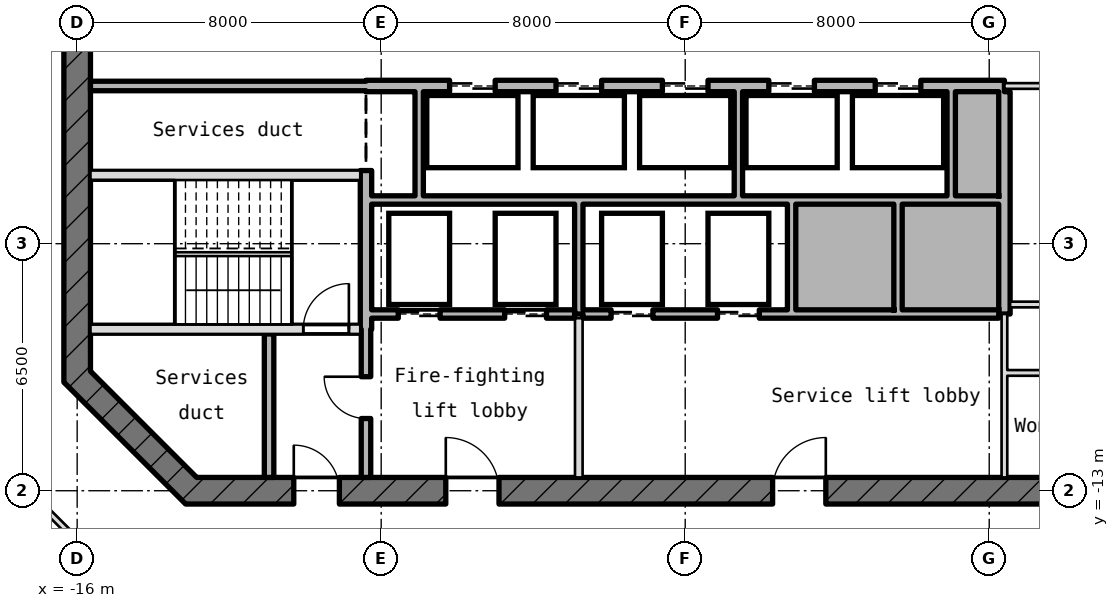
"""IFC4 building model, lengths in metres.
Left out: names, types, materials, properties, quantities, classifications, styles, units other than length and angle.
Written with IfcOpenShell. Run it as: python <this file> out.ifc"""

import sys

from ifc_helpers import new_model, si_unit, direction, frame, frame_2d, origin, place, context, subcontext, project, spatial, rectangle, extrude, element, fill, save


model = new_model("IFC4")
c1 = context("Model", 3, precision=1e-05, world=origin(), true_north=direction((0.0, 1.0)))
c2 = subcontext(c1, "Body", "Model", "MODEL_VIEW")
j1 = project(units=[si_unit("LENGTHUNIT", "METRE"), si_unit("PLANEANGLEUNIT", "RADIAN")], contexts=[c1])
p1 = place(None, origin())
s1 = spatial("IfcSite", under=j1, at=p1, CompositionType="ELEMENT")
p2 = place(p1, origin())
s2 = spatial("IfcBuilding", under=s1, at=p2, CompositionType="ELEMENT")
p3 = place(p2, frame((0.0, 0.0, 296.95)))
s3 = spatial("IfcBuildingStorey", under=s2, at=p3, CompositionType="ELEMENT", Elevation=296.95)
p4 = place(p3, frame((-16.0, 10.145, -0.18), z_axis=(0.0, 0.0, 1.0), x_axis=(0.0, -1.0, 0.0)))
e1 = element("IfcWall", 1, at=p4, inside=s3, PredefinedType="SHEAR", context=c2, shape_type="SweptSolid", body=[
    extrude(rectangle(XDim=20.29, YDim=0.7, at=frame_2d((10.145, 0.0))), origin(), (0.0, 0.0, 1.0), 4.15),
])
p5 = place(p4, frame((8.945, 0.0, 0.18)))
e2 = element("IfcOpeningElement", 2, at=p5, cuts=e1, PredefinedType="OPENING", context=c2, shape_type="SweptSolid", body=[
    extrude(rectangle(XDim=2.4, YDim=2.1, at=frame_2d((1.2, 1.05))), frame((0.0, 0.36, 0.0), z_axis=(0.0, -1.0, 0.0), x_axis=(1.0, 0.0, 0.0)), (0.0, 0.0, 1.0), 0.72),
])
p6 = place(p4, frame((5.545, 0.0, 0.18)))
e3 = element("IfcOpeningElement", 3, at=p6, cuts=e1, PredefinedType="OPENING", context=c2, shape_type="SweptSolid", body=[
    extrude(rectangle(XDim=1.2, YDim=2.1, at=frame_2d((0.6, 1.05))), frame((0.0, 0.36, 0.0), z_axis=(0.0, -1.0, 0.0), x_axis=(1.0, 0.0, 0.0)), (0.0, 0.0, 1.0), 0.72),
])
p7 = place(p3, frame((-16.103, -9.897, -0.18), z_axis=(0.0, 0.0, 1.0), x_axis=(0.707106781187, -0.707106781187, 0.0)))
e4 = element("IfcWall", 4, at=p7, inside=s3, PredefinedType="SHEAR", context=c2, shape_type="SweptSolid", body=[
    extrude(rectangle(XDim=4.533, YDim=0.7, at=frame_2d((2.266, 0.0))), origin(), (0.0, 0.0, 1.0), 4.15),
])
p8 = place(p3, frame((-13.145, -13.0, -0.18), z_axis=(0.0, 0.0, 1.0), x_axis=(1.0, 0.0, 0.0)))
e5 = element("IfcWall", 5, at=p8, inside=s3, PredefinedType="SHEAR", context=c2, shape_type="SweptSolid", body=[
    extrude(rectangle(XDim=26.29, YDim=0.7, at=frame_2d((13.145, 0.0))), origin(), (0.0, 0.0, 1.0), 4.15),
])
p9 = place(p8, frame((2.845, 0.0, 0.18)))
e6 = element("IfcOpeningElement", 6, at=p9, cuts=e5, PredefinedType="OPENING", context=c2, shape_type="SweptSolid", body=[
    extrude(rectangle(XDim=1.2, YDim=2.1, at=frame_2d((0.6, 1.05))), frame((0.0, 0.36, 0.0), z_axis=(0.0, -1.0, 0.0), x_axis=(1.0, 0.0, 0.0)), (0.0, 0.0, 1.0), 0.72),
])
p10 = place(p8, frame((6.845, 0.0, 0.18)))
e7 = element("IfcOpeningElement", 7, at=p10, cuts=e5, PredefinedType="OPENING", context=c2, shape_type="SweptSolid", body=[
    extrude(rectangle(XDim=1.4, YDim=2.1, at=frame_2d((0.7, 1.05))), frame((0.0, 0.36, 0.0), z_axis=(0.0, -1.0, 0.0), x_axis=(1.0, 0.0, 0.0)), (0.0, 0.0, 1.0), 0.72),
])
p11 = place(p8, frame((15.445, 0.0, 0.18)))
e8 = element("IfcOpeningElement", 8, at=p11, cuts=e5, PredefinedType="OPENING", context=c2, shape_type="SweptSolid", body=[
    extrude(rectangle(XDim=1.4, YDim=2.1, at=frame_2d((0.7, 1.05))), frame((0.0, 0.36, 0.0), z_axis=(0.0, -1.0, 0.0), x_axis=(1.0, 0.0, 0.0)), (0.0, 0.0, 1.0), 0.72),
])
p12 = place(p3, frame((8.475, -9.9, 0.0), z_axis=(0.0, 0.0, 1.0), x_axis=(1.0, 0.0, 0.0)))
e9 = element("IfcWall", 9, at=p12, inside=s3, PredefinedType="PARTITIONING", context=c2, shape_type="SweptSolid", body=[
    extrude(rectangle(XDim=7.13, YDim=0.15, at=frame_2d((3.565, 0.0))), origin(), (0.0, 0.0, 1.0), 3.97),
])
p13 = place(p12, frame((3.028, 0.0, 0.0)))
e10 = element("IfcOpeningElement", 10, at=p13, cuts=e9, PredefinedType="OPENING", context=c2, shape_type="SweptSolid", body=[
    extrude(rectangle(XDim=1.0, YDim=2.1, at=frame_2d((0.5, 1.05))), frame((0.0, 0.085, 0.0), z_axis=(0.0, -1.0, 0.0), x_axis=(1.0, 0.0, 0.0)), (0.0, 0.0, 1.0), 0.17),
])
p14 = place(p3, frame((-15.65, -8.75, -0.18), z_axis=(0.0, 0.0, 1.0), x_axis=(1.0, 0.0, 0.0)))
e11 = element("IfcWall", 11, at=p14, inside=s3, PredefinedType="SHEAR", context=c2, shape_type="SweptSolid", body=[
    extrude(rectangle(XDim=7.1, YDim=0.25, at=frame_2d((3.55, 0.0))), origin(), (0.0, 0.0, 1.0), 4.15),
])
p15 = place(p14, frame((5.6, 0.0, 0.18)))
e12 = element("IfcOpeningElement", 12, at=p15, cuts=e11, PredefinedType="OPENING", context=c2, shape_type="SweptSolid", body=[
    extrude(rectangle(XDim=1.2, YDim=2.1, at=frame_2d((0.6, 1.05))), frame((0.0, 0.135, 0.0), z_axis=(0.0, -1.0, 0.0), x_axis=(1.0, 0.0, 0.0)), (0.0, 0.0, 1.0), 0.27),
])
p16 = place(p3, frame((-8.25, -8.35, 0.0), z_axis=(0.0, 0.0, 1.0), x_axis=(1.0, 0.0, 0.0)))
e13 = element("IfcWall", 13, at=p16, inside=s3, PredefinedType="STANDARD", context=c2, shape_type="SweptSolid", body=[
    extrude(rectangle(XDim=5.34, YDim=0.22, at=frame_2d((2.67, 0.0))), origin(), (0.0, 0.0, 1.0), 3.97),
])
p17 = place(p16, frame((0.7, 0.0, 0.0)))
e14 = element("IfcOpeningElement", 14, at=p17, cuts=e13, PredefinedType="OPENING", context=c2, shape_type="SweptSolid", body=[
    extrude(rectangle(XDim=1.1, YDim=2.1, at=frame_2d((0.55, 1.05))), frame((0.0, 0.12, 0.0), z_axis=(0.0, -1.0, 0.0), x_axis=(1.0, 0.0, 0.0)), (0.0, 0.0, 1.0), 0.24),
])
p18 = place(p16, frame((3.5, 0.0, 0.0)))
e15 = element("IfcOpeningElement", 15, at=p18, cuts=e13, PredefinedType="OPENING", context=c2, shape_type="SweptSolid", body=[
    extrude(rectangle(XDim=1.1, YDim=2.1, at=frame_2d((0.55, 1.05))), frame((0.0, 0.12, 0.0), z_axis=(0.0, -1.0, 0.0), x_axis=(1.0, 0.0, 0.0)), (0.0, 0.0, 1.0), 0.24),
])
p19 = place(p3, frame((-2.69, -8.35, 0.0), z_axis=(0.0, 0.0, 1.0), x_axis=(1.0, 0.0, 0.0)))
e16 = element("IfcWall", 16, at=p19, inside=s3, PredefinedType="STANDARD", context=c2, shape_type="SweptSolid", body=[
    extrude(rectangle(XDim=10.94, YDim=0.22, at=frame_2d((5.47, 0.0))), origin(), (0.0, 0.0, 1.0), 3.97),
])
p20 = place(p19, frame((0.74, 0.0, 0.0)))
e17 = element("IfcOpeningElement", 17, at=p20, cuts=e16, PredefinedType="OPENING", context=c2, shape_type="SweptSolid", body=[
    extrude(rectangle(XDim=1.1, YDim=2.1, at=frame_2d((0.55, 1.05))), frame((0.0, 0.12, 0.0), z_axis=(0.0, -1.0, 0.0), x_axis=(1.0, 0.0, 0.0)), (0.0, 0.0, 1.0), 0.24),
])
p21 = place(p19, frame((3.54, 0.0, 0.0)))
e18 = element("IfcOpeningElement", 18, at=p21, cuts=e16, PredefinedType="OPENING", context=c2, shape_type="SweptSolid", body=[
    extrude(rectangle(XDim=1.1, YDim=2.1, at=frame_2d((0.55, 1.05))), frame((0.0, 0.12, 0.0), z_axis=(0.0, -1.0, 0.0), x_axis=(1.0, 0.0, 0.0)), (0.0, 0.0, 1.0), 0.24),
])
p22 = place(p3, frame((8.55, -8.1, 0.0), z_axis=(0.0, 0.0, 1.0), x_axis=(1.0, 0.0, 0.0)))
e19 = element("IfcWall", 19, at=p22, inside=s3, PredefinedType="PARTITIONING", context=c2, shape_type="SweptSolid", body=[
    extrude(rectangle(XDim=7.1, YDim=0.15, at=frame_2d((3.55, 0.0))), origin(), (0.0, 0.0, 1.0), 3.97),
])
p23 = place(p22, frame((2.975, 0.0, 0.0)))
e20 = element("IfcOpeningElement", 20, at=p23, cuts=e19, PredefinedType="OPENING", context=c2, shape_type="SweptSolid", body=[
    extrude(rectangle(XDim=1.0, YDim=2.1, at=frame_2d((0.5, 1.05))), frame((0.0, 0.085, 0.0), z_axis=(0.0, -1.0, 0.0), x_axis=(1.0, 0.0, 0.0)), (0.0, 0.0, 1.0), 0.17),
])
p24 = place(p3, frame((-8.25, -5.35, 0.0), z_axis=(0.0, 0.0, 1.0), x_axis=(1.0, 0.0, 0.0)))
e21 = element("IfcWall", 21, at=p24, inside=s3, PredefinedType="STANDARD", context=c2, shape_type="SweptSolid", body=[
    extrude(rectangle(XDim=16.5, YDim=0.22, at=frame_2d((8.25, 0.0))), origin(), (0.0, 0.0, 1.0), 3.97),
])
p25 = place(p3, frame((-15.65, -4.7, -0.18), z_axis=(0.0, 0.0, 1.0), x_axis=(1.0, 0.0, 0.0)))
e22 = element("IfcWall", 22, at=p25, inside=s3, PredefinedType="SHEAR", context=c2, shape_type="SweptSolid", body=[
    extrude(rectangle(XDim=7.1, YDim=0.25, at=frame_2d((3.55, 0.0))), origin(), (0.0, 0.0, 1.0), 4.15),
])
p26 = place(p3, frame((-15.65, -2.35, 0.0), z_axis=(0.0, 0.0, 1.0), x_axis=(1.0, 0.0, 0.0)))
e23 = element("IfcWall", 23, at=p26, inside=s3, PredefinedType="STANDARD", context=c2, shape_type="SweptSolid", body=[
    extrude(rectangle(XDim=7.25, YDim=0.25, at=frame_2d((3.625, 0.0))), origin(), (0.0, 0.0, 1.0), 3.97),
])
p27 = place(p3, frame((-8.4, -2.35, -0.18), z_axis=(0.0, 0.0, 1.0), x_axis=(1.0, 0.0, 0.0)))
e24 = element("IfcWall", 24, at=p27, inside=s3, PredefinedType="SHEAR", context=c2, shape_type="SweptSolid", body=[
    extrude(rectangle(XDim=16.8, YDim=0.3, at=frame_2d((8.4, 0.0))), origin(), (0.0, 0.0, 1.0), 4.15),
])
p28 = place(p27, frame((2.2, 0.0, 0.18)))
e25 = element("IfcOpeningElement", 25, at=p28, cuts=e24, PredefinedType="OPENING", context=c2, shape_type="SweptSolid", body=[
    extrude(rectangle(XDim=1.2, YDim=2.1, at=frame_2d((0.6, 1.05))), frame((0.0, 0.16, 0.0), z_axis=(0.0, -1.0, 0.0), x_axis=(1.0, 0.0, 0.0)), (0.0, 0.0, 1.0), 0.32),
])
p29 = place(p27, frame((5.0, 0.0, 0.18)))
e26 = element("IfcOpeningElement", 26, at=p29, cuts=e24, PredefinedType="OPENING", context=c2, shape_type="SweptSolid", body=[
    extrude(rectangle(XDim=1.2, YDim=2.1, at=frame_2d((0.6, 1.05))), frame((0.0, 0.16, 0.0), z_axis=(0.0, -1.0, 0.0), x_axis=(1.0, 0.0, 0.0)), (0.0, 0.0, 1.0), 0.32),
])
p30 = place(p27, frame((7.8, 0.0, 0.18)))
e27 = element("IfcOpeningElement", 27, at=p30, cuts=e24, PredefinedType="OPENING", context=c2, shape_type="SweptSolid", body=[
    extrude(rectangle(XDim=1.2, YDim=2.1, at=frame_2d((0.6, 1.05))), frame((0.0, 0.16, 0.0), z_axis=(0.0, -1.0, 0.0), x_axis=(1.0, 0.0, 0.0)), (0.0, 0.0, 1.0), 0.32),
])
p31 = place(p27, frame((10.6, 0.0, 0.18)))
e28 = element("IfcOpeningElement", 28, at=p31, cuts=e24, PredefinedType="OPENING", context=c2, shape_type="SweptSolid", body=[
    extrude(rectangle(XDim=1.2, YDim=2.1, at=frame_2d((0.6, 1.05))), frame((0.0, 0.16, 0.0), z_axis=(0.0, -1.0, 0.0), x_axis=(1.0, 0.0, 0.0)), (0.0, 0.0, 1.0), 0.32),
])
p32 = place(p27, frame((13.4, 0.0, 0.18)))
e29 = element("IfcOpeningElement", 29, at=p32, cuts=e24, PredefinedType="OPENING", context=c2, shape_type="SweptSolid", body=[
    extrude(rectangle(XDim=1.2, YDim=2.1, at=frame_2d((0.6, 1.05))), frame((0.0, 0.16, 0.0), z_axis=(0.0, -1.0, 0.0), x_axis=(1.0, 0.0, 0.0)), (0.0, 0.0, 1.0), 0.32),
])
p33 = place(p3, frame((8.4, -2.35, 0.0), z_axis=(0.0, 0.0, 1.0), x_axis=(1.0, 0.0, 0.0)))
e30 = element("IfcWall", 30, at=p33, inside=s3, PredefinedType="PARTITIONING", context=c2, shape_type="SweptSolid", body=[
    extrude(rectangle(XDim=7.25, YDim=0.15, at=frame_2d((3.625, 0.0))), origin(), (0.0, 0.0, 1.0), 3.97),
])
p34 = place(p3, frame((-10.95, -12.65, 0.0), z_axis=(0.0, 0.0, 1.0), x_axis=(0.0, 1.0, 0.0)))
e31 = element("IfcWall", 31, at=p34, inside=s3, PredefinedType="STANDARD", context=c2, shape_type="SweptSolid", body=[
    extrude(rectangle(XDim=3.775, YDim=0.25, at=frame_2d((1.887, 0.0))), origin(), (0.0, 0.0, 1.0), 3.97),
])
p35 = place(p3, frame((-8.4, -12.65, 0.0), z_axis=(0.0, 0.0, 1.0), x_axis=(0.0, 1.0, 0.0)))
e32 = element("IfcWall", 32, at=p35, inside=s3, PredefinedType="STANDARD", context=c2, shape_type="SweptSolid", body=[
    extrude(rectangle(XDim=3.9, YDim=0.25, at=frame_2d((1.95, 0.0))), origin(), (0.0, 0.0, 1.0), 3.97),
])
p36 = place(p35, frame((1.55, 0.0, 0.0)))
e33 = element("IfcOpeningElement", 33, at=p36, cuts=e32, PredefinedType="OPENING", context=c2, shape_type="SweptSolid", body=[
    extrude(rectangle(XDim=1.1, YDim=2.1, at=frame_2d((0.55, 1.05))), frame((0.0, 0.135, 0.0), z_axis=(0.0, -1.0, 0.0), x_axis=(1.0, 0.0, 0.0)), (0.0, 0.0, 1.0), 0.27),
])
p37 = place(p3, frame((-8.4, -8.75, -0.18), z_axis=(0.0, 0.0, 1.0), x_axis=(0.0, 1.0, 0.0)))
e34 = element("IfcWall", 34, at=p37, inside=s3, PredefinedType="SHEAR", context=c2, shape_type="SweptSolid", body=[
    extrude(rectangle(XDim=4.175, YDim=0.3, at=frame_2d((2.087, 0.0))), origin(), (0.0, 0.0, 1.0), 4.15),
])
p38 = place(p3, frame((-7.0, -5.24, 0.0), z_axis=(0.0, 0.0, 1.0), x_axis=(0.0, 1.0, 0.0)))
e35 = element("IfcWall", 35, at=p38, inside=s3, PredefinedType="STANDARD", context=c2, shape_type="SweptSolid", body=[
    extrude(rectangle(XDim=2.74, YDim=0.22, at=frame_2d((1.37, 0.0))), origin(), (0.0, 0.0, 1.0), 3.97),
])
p39 = place(p3, frame((-2.8, -12.65, 0.0), z_axis=(0.0, 0.0, 1.0), x_axis=(0.0, 1.0, 0.0)))
e36 = element("IfcWall", 36, at=p39, inside=s3, PredefinedType="PARTITIONING", context=c2, shape_type="SweptSolid", body=[
    extrude(rectangle(XDim=4.19, YDim=0.2, at=frame_2d((2.095, 0.0))), origin(), (0.0, 0.0, 1.0), 3.97),
])
p40 = place(p3, frame((-2.8, -8.35, 0.0), z_axis=(0.0, 0.0, 1.0), x_axis=(0.0, 1.0, 0.0)))
e37 = element("IfcWall", 37, at=p40, inside=s3, PredefinedType="STANDARD", context=c2, shape_type="SweptSolid", body=[
    extrude(rectangle(XDim=2.89, YDim=0.22, at=frame_2d((1.445, 0.0))), origin(), (0.0, 0.0, 1.0), 3.97),
])
p41 = place(p3, frame((1.4, -5.24, 0.0), z_axis=(0.0, 0.0, 1.0), x_axis=(0.0, 1.0, 0.0)))
e38 = element("IfcWall", 38, at=p41, inside=s3, PredefinedType="STANDARD", context=c2, shape_type="SweptSolid", body=[
    extrude(rectangle(XDim=2.74, YDim=0.22, at=frame_2d((1.37, 0.0))), origin(), (0.0, 0.0, 1.0), 3.97),
])
for number, where, z_axis, x_axis in (
    (39, (2.8, -8.24, 0.0), (0.0, 0.0, 1.0), (0.0, 1.0, 0.0)),
    (40, (5.6, -8.24, 0.0), (0.0, 0.0, 1.0), (0.0, 1.0, 0.0)),
):
    element("IfcWall", number, at=place(p3, frame(where, z_axis=z_axis, x_axis=x_axis)), inside=s3, PredefinedType="STANDARD", context=c2, shape_type="SweptSolid", body=[
        extrude(rectangle(XDim=2.78, YDim=0.22, at=frame_2d((1.39, 0.0))), origin(), (0.0, 0.0, 1.0), 3.97),
    ])
p42 = place(p3, frame((7.0, -5.24, 0.0), z_axis=(0.0, 0.0, 1.0), x_axis=(0.0, 1.0, 0.0)))
e41 = element("IfcWall", 41, at=p42, inside=s3, PredefinedType="STANDARD", context=c2, shape_type="SweptSolid", body=[
    extrude(rectangle(XDim=2.74, YDim=0.22, at=frame_2d((1.37, 0.0))), origin(), (0.0, 0.0, 1.0), 3.97),
])
p43 = place(p3, frame((8.4, -12.65, 0.0), z_axis=(0.0, 0.0, 1.0), x_axis=(0.0, 1.0, 0.0)))
e42 = element("IfcWall", 42, at=p43, inside=s3, PredefinedType="PARTITIONING", context=c2, shape_type="SweptSolid", body=[
    extrude(rectangle(XDim=4.3, YDim=0.15, at=frame_2d((2.15, 0.0))), origin(), (0.0, 0.0, 1.0), 3.97),
])
p44 = place(p3, frame((8.4, -8.35, -0.18), z_axis=(0.0, 0.0, 1.0), x_axis=(0.0, 1.0, 0.0)))
e43 = element("IfcWall", 43, at=p44, inside=s3, PredefinedType="SHEAR", context=c2, shape_type="SweptSolid", body=[
    extrude(rectangle(XDim=5.85, YDim=0.3, at=frame_2d((2.925, 0.0))), origin(), (0.0, 0.0, 1.0), 4.15),
])
p45 = place(p3, frame((-14.263, -16.05, 0.0), z_axis=(0.0, 0.0, 1.0), x_axis=(-0.707106781187, 0.707106781187, 0.0)))
e44 = element("IfcWall", 44, at=p45, inside=s3, PredefinedType="PARTITIONING", context=c2, shape_type="SweptSolid", body=[
    extrude(rectangle(XDim=6.769, YDim=0.15, at=frame_2d((3.385, 0.0))), origin(), (0.0, 0.0, 1.0), 3.97),
])
p46 = place(p28, origin())
e45 = element("IfcDoor", 45, at=p46, inside=s3, OperationType="DOUBLE_DOOR_SLIDING", PredefinedType="DOOR", context=c2, shape_type="SweptSolid", body=[
    extrude(rectangle(XDim=1.2, YDim=2.1, at=frame_2d((0.6, 1.05))), frame((0.0, 0.025, 0.0), z_axis=(0.0, -1.0, 0.0), x_axis=(1.0, 0.0, 0.0)), (0.0, 0.0, 1.0), 0.05),
])
fill(e25, e45)
p47 = place(p29, origin())
e46 = element("IfcDoor", 46, at=p47, inside=s3, OperationType="DOUBLE_DOOR_SLIDING", PredefinedType="DOOR", context=c2, shape_type="SweptSolid", body=[
    extrude(rectangle(XDim=1.2, YDim=2.1, at=frame_2d((0.6, 1.05))), frame((0.0, 0.025, 0.0), z_axis=(0.0, -1.0, 0.0), x_axis=(1.0, 0.0, 0.0)), (0.0, 0.0, 1.0), 0.05),
])
fill(e26, e46)
p48 = place(p30, origin())
e47 = element("IfcDoor", 47, at=p48, inside=s3, OperationType="DOUBLE_DOOR_SLIDING", PredefinedType="DOOR", context=c2, shape_type="SweptSolid", body=[
    extrude(rectangle(XDim=1.2, YDim=2.1, at=frame_2d((0.6, 1.05))), frame((0.0, 0.025, 0.0), z_axis=(0.0, -1.0, 0.0), x_axis=(1.0, 0.0, 0.0)), (0.0, 0.0, 1.0), 0.05),
])
fill(e27, e47)
p49 = place(p31, origin())
e48 = element("IfcDoor", 48, at=p49, inside=s3, OperationType="DOUBLE_DOOR_SLIDING", PredefinedType="DOOR", context=c2, shape_type="SweptSolid", body=[
    extrude(rectangle(XDim=1.2, YDim=2.1, at=frame_2d((0.6, 1.05))), frame((0.0, 0.025, 0.0), z_axis=(0.0, -1.0, 0.0), x_axis=(1.0, 0.0, 0.0)), (0.0, 0.0, 1.0), 0.05),
])
fill(e28, e48)
p50 = place(p32, origin())
e49 = element("IfcDoor", 49, at=p50, inside=s3, OperationType="DOUBLE_DOOR_SLIDING", PredefinedType="DOOR", context=c2, shape_type="SweptSolid", body=[
    extrude(rectangle(XDim=1.2, YDim=2.1, at=frame_2d((0.6, 1.05))), frame((0.0, 0.025, 0.0), z_axis=(0.0, -1.0, 0.0), x_axis=(1.0, 0.0, 0.0)), (0.0, 0.0, 1.0), 0.05),
])
fill(e29, e49)
p51 = place(p17, origin())
e50 = element("IfcDoor", 50, at=p51, inside=s3, OperationType="DOUBLE_DOOR_SLIDING", PredefinedType="DOOR", context=c2, shape_type="SweptSolid", body=[
    extrude(rectangle(XDim=1.1, YDim=2.1, at=frame_2d((0.55, 1.05))), frame((0.0, 0.025, 0.0), z_axis=(0.0, -1.0, 0.0), x_axis=(1.0, 0.0, 0.0)), (0.0, 0.0, 1.0), 0.05),
])
fill(e14, e50)
p52 = place(p18, origin())
e51 = element("IfcDoor", 51, at=p52, inside=s3, OperationType="DOUBLE_DOOR_SLIDING", PredefinedType="DOOR", context=c2, shape_type="SweptSolid", body=[
    extrude(rectangle(XDim=1.1, YDim=2.1, at=frame_2d((0.55, 1.05))), frame((0.0, 0.025, 0.0), z_axis=(0.0, -1.0, 0.0), x_axis=(1.0, 0.0, 0.0)), (0.0, 0.0, 1.0), 0.05),
])
fill(e15, e51)
p53 = place(p20, origin())
e52 = element("IfcDoor", 52, at=p53, inside=s3, OperationType="DOUBLE_DOOR_SLIDING", PredefinedType="DOOR", context=c2, shape_type="SweptSolid", body=[
    extrude(rectangle(XDim=1.1, YDim=2.1, at=frame_2d((0.55, 1.05))), frame((0.0, 0.025, 0.0), z_axis=(0.0, -1.0, 0.0), x_axis=(1.0, 0.0, 0.0)), (0.0, 0.0, 1.0), 0.05),
])
fill(e17, e52)
p54 = place(p21, origin())
e53 = element("IfcDoor", 53, at=p54, inside=s3, OperationType="DOUBLE_DOOR_SLIDING", PredefinedType="DOOR", context=c2, shape_type="SweptSolid", body=[
    extrude(rectangle(XDim=1.1, YDim=2.1, at=frame_2d((0.55, 1.05))), frame((0.0, 0.025, 0.0), z_axis=(0.0, -1.0, 0.0), x_axis=(1.0, 0.0, 0.0)), (0.0, 0.0, 1.0), 0.05),
])
fill(e18, e53)
p55 = place(p15, origin())
e54 = element("IfcDoor", 54, at=p55, inside=s3, OperationType="SINGLE_SWING_RIGHT", PredefinedType="DOOR", context=c2, shape_type="SweptSolid", body=[
    extrude(rectangle(XDim=1.2, YDim=2.1, at=frame_2d((0.6, 1.05))), frame((0.0, 0.025, 0.0), z_axis=(0.0, -1.0, 0.0), x_axis=(1.0, 0.0, 0.0)), (0.0, 0.0, 1.0), 0.05),
])
fill(e12, e54)
p56 = place(p36, origin())
e55 = element("IfcDoor", 55, at=p56, inside=s3, OperationType="SINGLE_SWING_RIGHT", PredefinedType="DOOR", context=c2, shape_type="SweptSolid", body=[
    extrude(rectangle(XDim=1.1, YDim=2.1, at=frame_2d((0.55, 1.05))), frame((0.0, 0.025, 0.0), z_axis=(0.0, -1.0, 0.0), x_axis=(1.0, 0.0, 0.0)), (0.0, 0.0, 1.0), 0.05),
])
fill(e33, e55)
p57 = place(p9, origin())
e56 = element("IfcDoor", 56, at=p57, inside=s3, OperationType="SINGLE_SWING_RIGHT", PredefinedType="DOOR", context=c2, shape_type="SweptSolid", body=[
    extrude(rectangle(XDim=1.2, YDim=2.1, at=frame_2d((0.6, 1.05))), frame((0.0, 0.025, 0.0), z_axis=(0.0, -1.0, 0.0), x_axis=(1.0, 0.0, 0.0)), (0.0, 0.0, 1.0), 0.05),
])
fill(e6, e56)
p58 = place(p10, origin())
e57 = element("IfcDoor", 57, at=p58, inside=s3, OperationType="SINGLE_SWING_RIGHT", PredefinedType="DOOR", context=c2, shape_type="SweptSolid", body=[
    extrude(rectangle(XDim=1.4, YDim=2.1, at=frame_2d((0.7, 1.05))), frame((0.0, 0.025, 0.0), z_axis=(0.0, -1.0, 0.0), x_axis=(1.0, 0.0, 0.0)), (0.0, 0.0, 1.0), 0.05),
])
fill(e7, e57)
p59 = place(p11, origin())
e58 = element("IfcDoor", 58, at=p59, inside=s3, OperationType="SINGLE_SWING_RIGHT", PredefinedType="DOOR", context=c2, shape_type="SweptSolid", body=[
    extrude(rectangle(XDim=1.4, YDim=2.1, at=frame_2d((0.7, 1.05))), frame((0.0, 0.025, 0.0), z_axis=(0.0, -1.0, 0.0), x_axis=(1.0, 0.0, 0.0)), (0.0, 0.0, 1.0), 0.05),
])
fill(e8, e58)
save(model, sys.argv[1])
